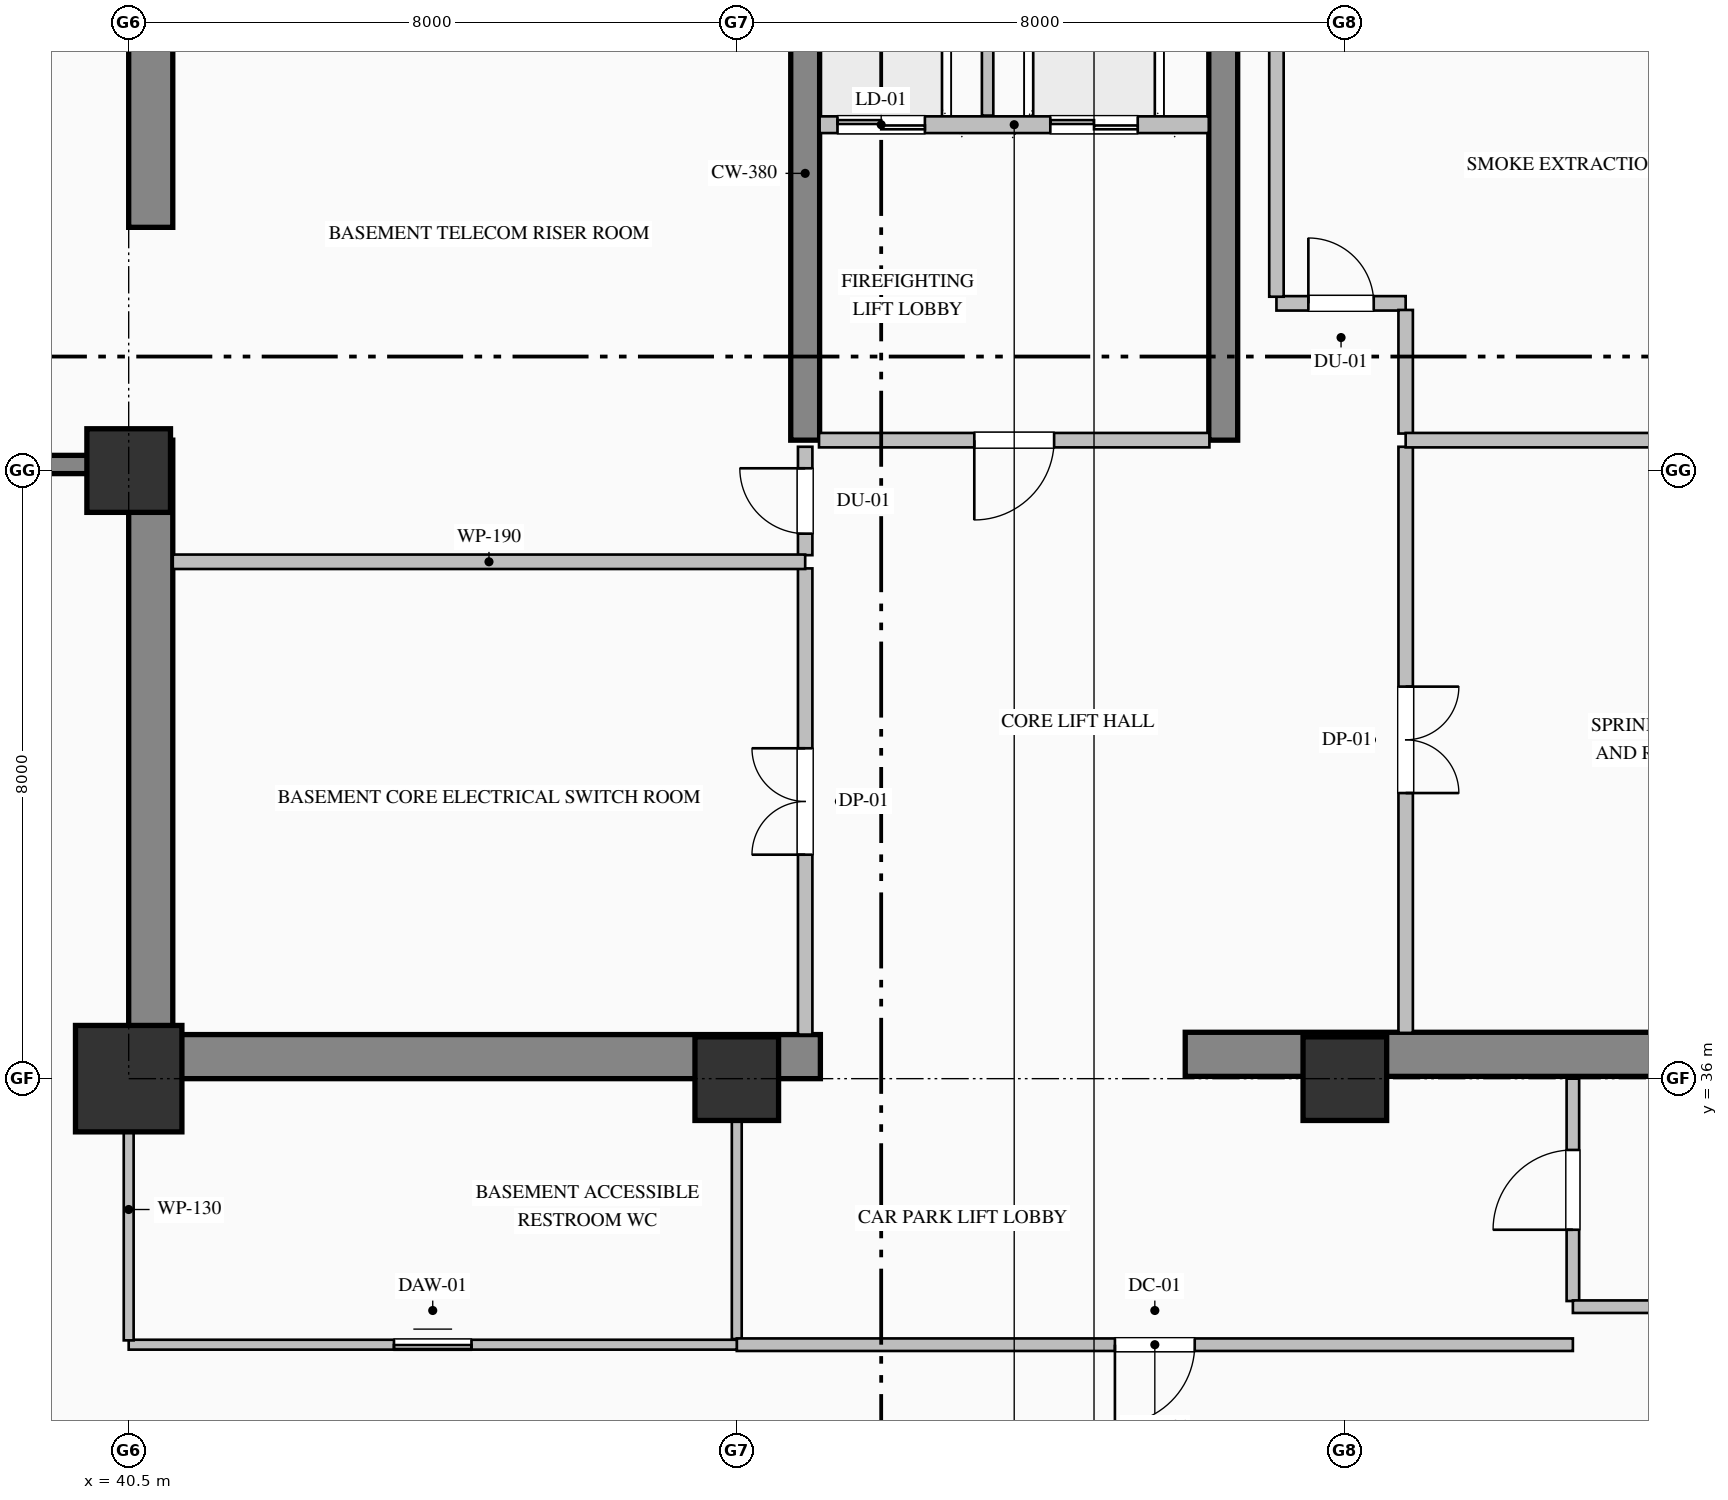
"""IFC4 building model, lengths in metres.
Left out: names, types, materials, properties, quantities, classifications, styles, units other than length and angle.
Written with IfcOpenShell. Run it as: python <this file> out.ifc"""

import sys

from ifc_helpers import new_model, si_unit, direction, frame, frame_2d, origin, origin_2d, place, context, subcontext, project, spatial, rectangle, hollow_rectangle, extrude, element, fill, save


model = new_model("IFC4")
c1 = context("Model", 3, precision=1e-05, world=origin(), true_north=direction((0.0, 1.0)))
c2 = subcontext(c1, "Body", "Model", "MODEL_VIEW")
j1 = project(units=[si_unit("LENGTHUNIT", "METRE"), si_unit("PLANEANGLEUNIT", "RADIAN")], contexts=[c1])
p1 = place(None, origin())
s1 = spatial("IfcSite", under=j1, at=p1, CompositionType="ELEMENT")
p2 = place(p1, origin())
s2 = spatial("IfcBuilding", under=s1, at=p2, CompositionType="ELEMENT")
p3 = place(p2, frame((0.0, 0.0, -4.6)))
s3 = spatial("IfcBuildingStorey", under=s2, at=p3, CompositionType="ELEMENT", Elevation=-4.6)
p4 = place(p3, frame((40.79, 36.58, 0.0), z_axis=(0.0, 0.0, 1.0), x_axis=(0.0, 1.0, 0.0)))
e1 = element("IfcWall", 1, at=p4, inside=s3, PredefinedType="SHEAR", context=c2, shape_type="SweptSolid", body=[
    extrude(rectangle(XDim=7.82, YDim=0.58, at=frame_2d((3.91, 0.0))), origin(), (0.0, 0.0, 1.0), 4.18),
])
p5 = place(p3, frame((40.79, 47.2, 0.0), z_axis=(0.0, 0.0, 1.0), x_axis=(0.0, 1.0, 0.0)))
e2 = element("IfcWall", 2, at=p5, inside=s3, PredefinedType="SHEAR", context=c2, shape_type="SweptSolid", body=[
    extrude(rectangle(XDim=4.22, YDim=0.58, at=frame_2d((2.11, 0.0))), origin(), (0.0, 0.0, 1.0), 4.18),
])
p6 = place(p3, frame((40.5, 36.29, 0.0), z_axis=(0.0, 0.0, 1.0), x_axis=(1.0, 0.0, 0.0)))
e3 = element("IfcWall", 3, at=p6, inside=s3, PredefinedType="SHEAR", context=c2, shape_type="SweptSolid", body=[
    extrude(rectangle(XDim=9.1, YDim=0.58, at=frame_2d((4.55, 0.0))), origin(), (0.0, 0.0, 1.0), 4.18),
])
p7 = place(p3, frame((54.4, 36.32, 0.0), z_axis=(0.0, 0.0, 1.0), x_axis=(1.0, 0.0, 0.0)))
e4 = element("IfcWall", 4, at=p7, inside=s3, PredefinedType="SHEAR", context=c2, shape_type="SweptSolid", body=[
    extrude(rectangle(XDim=9.6, YDim=0.58, at=frame_2d((4.8, 0.0))), origin(), (0.0, 0.0, 1.0), 4.6),
])
for number, where, z_axis, x_axis in (
    (5, (49.4, 44.4, 0.0), (0.0, 0.0, 1.0), (0.0, 1.0, 0.0)),
    (6, (54.9, 44.4, 0.0), (0.0, 0.0, 1.0), (0.0, 1.0, 0.0)),
):
    element("IfcWall", number, at=place(p3, frame(where, z_axis=z_axis, x_axis=x_axis)), inside=s3, PredefinedType="SHEAR", context=c2, shape_type="SweptSolid", body=[
        extrude(rectangle(XDim=7.02, YDim=0.38, at=frame_2d((3.51, 0.0))), origin(), (0.0, 0.0, 1.0), 4.18),
    ])
p8 = place(p3, frame((40.5, 36.0, 0.0), z_axis=(0.0, 0.0, 1.0), x_axis=(1.0, 0.0, 0.0)))
e7 = element("IfcColumn", 7, at=p8, inside=s3, PredefinedType="COLUMN", context=c2, shape_type="SweptSolid", body=[
    extrude(hollow_rectangle(XDim=1.4, YDim=1.4, WallThickness=0.05, at=origin_2d()), origin(), (0.0, 0.0, 1.0), 4.6),
])
for number, where, z_axis, x_axis in (
    (8, (40.5, 44.0, 0.0), (0.0, 0.0, 1.0), (1.0, 0.0, 0.0)),
    (9, (48.5, 36.0, 0.0), (0.0, 0.0, 1.0), (1.0, 0.0, 0.0)),
    (10, (56.5, 36.0, 0.0), (0.0, 0.0, 1.0), (1.0, 0.0, 0.0)),
):
    element("IfcColumn", number, at=place(p3, frame(where, z_axis=z_axis, x_axis=x_axis)), inside=s3, PredefinedType="COLUMN", context=c2, shape_type="SweptSolid", body=[
        extrude(rectangle(XDim=1.1, YDim=1.1, at=origin_2d()), origin(), (0.0, 0.0, 1.0), 4.6),
    ])
p9 = place(p3, frame((39.97, 44.08, 0.0), z_axis=(0.0, 0.0, 1.0), x_axis=(-1.0, 0.0, 0.0)))
e11 = element("IfcWall", 11, at=p9, inside=s3, PredefinedType="SOLIDWALL", context=c2, shape_type="SweptSolid", body=[
    extrude(rectangle(XDim=8.41, YDim=0.24, at=frame_2d((4.205, 0.0))), origin(), (0.0, 0.0, 1.0), 4.6),
])
p10 = place(p3, frame((54.71, 48.55, 0.0), z_axis=(0.0, 0.0, 1.0), x_axis=(-1.0, 0.0, 0.0)))
e12 = element("IfcWall", 12, at=p10, inside=s3, PredefinedType="PARTITIONING", context=c2, shape_type="SweptSolid", body=[
    extrude(rectangle(XDim=5.12, YDim=0.22, at=frame_2d((2.56, 0.0))), origin(), (0.0, 0.0, 1.0), 4.18),
])
p11 = place(p10, frame((3.735, 0.0, 0.0)))
e13 = element("IfcOpeningElement", 13, at=p11, cuts=e12, PredefinedType="OPENING", context=c2, shape_type="SweptSolid", body=[
    extrude(rectangle(XDim=1.15, YDim=2.2, at=frame_2d((0.575, 1.1))), frame((0.0, 0.12, 0.0), z_axis=(0.0, -1.0, 0.0), x_axis=(1.0, 0.0, 0.0)), (0.0, 0.0, 1.0), 0.24),
])
p12 = place(p10, frame((0.935, 0.0, 0.0)))
e14 = element("IfcOpeningElement", 14, at=p12, cuts=e12, PredefinedType="OPENING", context=c2, shape_type="SweptSolid", body=[
    extrude(rectangle(XDim=1.15, YDim=2.2, at=frame_2d((0.575, 1.1))), frame((0.0, 0.12, 0.0), z_axis=(0.0, -1.0, 0.0), x_axis=(1.0, 0.0, 0.0)), (0.0, 0.0, 1.0), 0.24),
])
p13 = place(p3, frame((51.8, 48.67, 0.0), z_axis=(0.0, 0.0, 1.0), x_axis=(0.0, 1.0, 0.0)))
e15 = element("IfcWall", 15, at=p13, inside=s3, PredefinedType="PARTITIONING", context=c2, shape_type="SweptSolid", body=[
    extrude(rectangle(XDim=2.75, YDim=0.15, at=frame_2d((1.375, 0.0))), origin(), (0.0, 0.0, 1.0), 4.18),
])
p14 = place(p3, frame((54.718, 44.4, 0.0), z_axis=(0.0, 0.0, 1.0), x_axis=(-1.0, 0.0, 0.0)))
e16 = element("IfcWall", 16, at=p14, inside=s3, PredefinedType="PARTITIONING", context=c2, shape_type="SweptSolid", body=[
    extrude(rectangle(XDim=5.136, YDim=0.19, at=frame_2d((2.568, 0.0))), origin(), (0.0, 0.0, 1.0), 4.18),
])
p15 = place(p14, frame((2.043, 0.0, 0.0)))
e17 = element("IfcOpeningElement", 17, at=p15, cuts=e16, PredefinedType="OPENING", context=c2, shape_type="SweptSolid", body=[
    extrude(rectangle(XDim=1.05, YDim=2.15, at=frame_2d((0.525, 1.075))), frame((0.0, 0.105, 0.0), z_axis=(0.0, -1.0, 0.0), x_axis=(1.0, 0.0, 0.0)), (0.0, 0.0, 1.0), 0.21),
])
p16 = place(p3, frame((49.4, 36.58, 0.0), z_axis=(0.0, 0.0, 1.0), x_axis=(0.0, 1.0, 0.0)))
e18 = element("IfcWall", 18, at=p16, inside=s3, PredefinedType="PARTITIONING", context=c2, shape_type="SweptSolid", body=[
    extrude(rectangle(XDim=6.133, YDim=0.19, at=frame_2d((3.066, 0.0))), origin(), (0.0, 0.0, 1.0), 3.272),
])
p17 = place(p16, frame((2.366, 0.0, 0.0)))
e19 = element("IfcOpeningElement", 19, at=p17, cuts=e18, PredefinedType="OPENING", context=c2, shape_type="SweptSolid", body=[
    extrude(rectangle(XDim=1.4, YDim=2.25, at=frame_2d((0.7, 1.125))), frame((0.0, 0.105, 0.0), z_axis=(0.0, -1.0, 0.0), x_axis=(1.0, 0.0, 0.0)), (0.0, 0.0, 1.0), 0.21),
])
p18 = place(p3, frame((49.4, 42.887, 0.0), z_axis=(0.0, 0.0, 1.0), x_axis=(0.0, 1.0, 0.0)))
e20 = element("IfcWall", 20, at=p18, inside=s3, PredefinedType="PARTITIONING", context=c2, shape_type="SweptSolid", body=[
    extrude(rectangle(XDim=1.426, YDim=0.19, at=frame_2d((0.713, 0.0))), origin(), (0.0, 0.0, 1.0), 3.272),
])
p19 = place(p18, frame((0.283, 0.0, 0.0)))
e21 = element("IfcOpeningElement", 21, at=p19, cuts=e20, PredefinedType="OPENING", context=c2, shape_type="SweptSolid", body=[
    extrude(rectangle(XDim=0.86, YDim=2.1, at=frame_2d((0.43, 1.05))), frame((0.0, 0.105, 0.0), z_axis=(0.0, -1.0, 0.0), x_axis=(1.0, 0.0, 0.0)), (0.0, 0.0, 1.0), 0.21),
])
p20 = place(p3, frame((57.3, 44.313, 0.0), z_axis=(0.0, 0.0, 1.0), x_axis=(0.0, -1.0, 0.0)))
e22 = element("IfcWall", 22, at=p20, inside=s3, PredefinedType="PARTITIONING", context=c2, shape_type="SweptSolid", body=[
    extrude(rectangle(XDim=7.711, YDim=0.19, at=frame_2d((3.855, 0.0))), origin(), (0.0, 0.0, 1.0), 4.18),
])
p21 = place(p20, frame((3.156, 0.0, 0.0)))
e23 = element("IfcOpeningElement", 23, at=p21, cuts=e22, PredefinedType="OPENING", context=c2, shape_type="SweptSolid", body=[
    extrude(rectangle(XDim=1.4, YDim=2.25, at=frame_2d((0.7, 1.125))), frame((0.0, 0.105, 0.0), z_axis=(0.0, -1.0, 0.0), x_axis=(1.0, 0.0, 0.0)), (0.0, 0.0, 1.0), 0.21),
])
p22 = place(p3, frame((55.6, 46.2, 0.0), z_axis=(0.0, 0.0, 1.0), x_axis=(1.0, 0.0, 0.0)))
e24 = element("IfcWall", 24, at=p22, inside=s3, PredefinedType="PARTITIONING", context=c2, shape_type="SweptSolid", body=[
    extrude(rectangle(XDim=1.7, YDim=0.19, at=frame_2d((0.85, 0.0))), origin(), (0.0, 0.0, 1.0), 4.18),
])
p23 = place(p22, frame((0.42, 0.0, 0.0)))
e25 = element("IfcOpeningElement", 25, at=p23, cuts=e24, PredefinedType="OPENING", context=c2, shape_type="SweptSolid", body=[
    extrude(rectangle(XDim=0.86, YDim=2.1, at=frame_2d((0.43, 1.05))), frame((0.0, 0.105, 0.0), z_axis=(0.0, -1.0, 0.0), x_axis=(1.0, 0.0, 0.0)), (0.0, 0.0, 1.0), 0.21),
])
p24 = place(p3, frame((57.3, 46.113, 0.0), z_axis=(0.0, 0.0, 1.0), x_axis=(0.0, -1.0, 0.0)))
e26 = element("IfcWall", 26, at=p24, inside=s3, PredefinedType="PARTITIONING", context=c2, shape_type="SweptSolid", body=[
    extrude(rectangle(XDim=1.626, YDim=0.19, at=frame_2d((0.813, 0.0))), origin(), (0.0, 0.0, 1.0), 4.18),
])
p25 = place(p3, frame((41.08, 42.8, 0.0), z_axis=(0.0, 0.0, 1.0), x_axis=(1.0, 0.0, 0.0)))
e27 = element("IfcWall", 27, at=p25, inside=s3, PredefinedType="PARTITIONING", context=c2, shape_type="SweptSolid", body=[
    extrude(rectangle(XDim=8.32, YDim=0.19, at=frame_2d((4.16, 0.0))), origin(), (0.0, 0.0, 1.0), 4.18),
])
p26 = place(p3, frame((57.3, 44.4, 0.0), z_axis=(0.0, 0.0, 1.0), x_axis=(1.0, 0.0, 0.0)))
e28 = element("IfcWall", 28, at=p26, inside=s3, PredefinedType="PARTITIONING", context=c2, shape_type="SweptSolid", body=[
    extrude(rectangle(XDim=6.12, YDim=0.19, at=frame_2d((3.06, 0.0))), origin(), (0.0, 0.0, 1.0), 4.18),
])
p27 = place(p3, frame((55.6, 46.287, 0.0), z_axis=(0.0, 0.0, 1.0), x_axis=(0.0, 1.0, 0.0)))
e29 = element("IfcWall", 29, at=p27, inside=s3, PredefinedType="PARTITIONING", context=c2, shape_type="SweptSolid", body=[
    extrude(rectangle(XDim=5.133, YDim=0.19, at=frame_2d((2.566, 0.0))), origin(), (0.0, 0.0, 1.0), 4.18),
])
p28 = place(p3, frame((59.5, 33.074, 0.0), z_axis=(0.0, 0.0, 1.0), x_axis=(0.0, 1.0, 0.0)))
e30 = element("IfcWall", 30, at=p28, inside=s3, PredefinedType="PARTITIONING", context=c2, shape_type="SweptSolid", body=[
    extrude(rectangle(XDim=2.926, YDim=0.165, at=frame_2d((1.463, 0.0))), origin(), (0.0, 0.0, 1.0), 4.18),
])
p29 = place(p28, frame((0.938, 0.0, 0.0)))
e31 = element("IfcOpeningElement", 31, at=p29, cuts=e30, PredefinedType="OPENING", context=c2, shape_type="SweptSolid", body=[
    extrude(rectangle(XDim=1.05, YDim=2.15, at=frame_2d((0.525, 1.075))), frame((0.0, 0.093, 0.0), z_axis=(0.0, -1.0, 0.0), x_axis=(1.0, 0.0, 0.0)), (0.0, 0.0, 1.0), 0.185),
])
p30 = place(p3, frame((66.8, 33.0, 0.0), z_axis=(0.0, 0.0, 1.0), x_axis=(-1.0, 0.0, 0.0)))
e32 = element("IfcWall", 32, at=p30, inside=s3, PredefinedType="PARTITIONING", context=c2, shape_type="SweptSolid", body=[
    extrude(rectangle(XDim=7.3, YDim=0.165, at=frame_2d((3.65, 0.0))), origin(), (0.0, 0.0, 1.0), 4.18),
])
p31 = place(p30, frame((3.125, 0.0, 0.0)))
e33 = element("IfcOpeningElement", 33, at=p31, cuts=e32, PredefinedType="OPENING", context=c2, shape_type="SweptSolid", body=[
    extrude(rectangle(XDim=1.05, YDim=2.15, at=frame_2d((0.525, 1.075))), frame((0.0, 0.093, 0.0), z_axis=(0.0, -1.0, 0.0), x_axis=(1.0, 0.0, 0.0)), (0.0, 0.0, 1.0), 0.185),
])
p32 = place(p3, frame((48.5, 32.574, 0.0), z_axis=(0.0, 0.0, 1.0), x_axis=(0.0, 1.0, 0.0)))
e34 = element("IfcWall", 34, at=p32, inside=s3, PredefinedType="PARTITIONING", context=c2, shape_type="SweptSolid", body=[
    extrude(rectangle(XDim=3.426, YDim=0.13, at=frame_2d((1.713, 0.0))), origin(), (0.0, 0.0, 1.0), 3.272),
])
p33 = place(p3, frame((59.5, 32.5, 0.0), z_axis=(0.0, 0.0, 1.0), x_axis=(-1.0, 0.0, 0.0)))
e35 = element("IfcWall", 35, at=p33, inside=s3, PredefinedType="PARTITIONING", context=c2, shape_type="SweptSolid", body=[
    extrude(rectangle(XDim=11.0, YDim=0.165, at=frame_2d((5.5, 0.0))), origin(), (0.0, 0.0, 1.0), 4.18),
])
p34 = place(p33, frame((4.975, 0.0, 0.0)))
e36 = element("IfcOpeningElement", 36, at=p34, cuts=e35, PredefinedType="OPENING", context=c2, shape_type="SweptSolid", body=[
    extrude(rectangle(XDim=1.05, YDim=2.15, at=frame_2d((0.525, 1.075))), frame((0.0, 0.093, 0.0), z_axis=(0.0, -1.0, 0.0), x_axis=(1.0, 0.0, 0.0)), (0.0, 0.0, 1.0), 0.185),
])
p35 = place(p3, frame((48.5, 32.5, 0.0), z_axis=(0.0, 0.0, 1.0), x_axis=(-1.0, 0.0, 0.0)))
e37 = element("IfcWall", 37, at=p35, inside=s3, PredefinedType="PARTITIONING", context=c2, shape_type="SweptSolid", body=[
    extrude(rectangle(XDim=8.0, YDim=0.13, at=frame_2d((4.0, 0.0))), origin(), (0.0, 0.0, 1.0), 4.18),
])
p36 = place(p35, frame((3.49, 0.0, 0.0)))
e38 = element("IfcOpeningElement", 38, at=p36, cuts=e37, PredefinedType="OPENING", context=c2, shape_type="SweptSolid", body=[
    extrude(rectangle(XDim=1.02, YDim=2.15, at=frame_2d((0.51, 1.075))), frame((0.0, 0.075, 0.0), z_axis=(0.0, -1.0, 0.0), x_axis=(1.0, 0.0, 0.0)), (0.0, 0.0, 1.0), 0.15),
])
p37 = place(p3, frame((40.5, 32.557, 0.0), z_axis=(0.0, 0.0, 1.0), x_axis=(0.0, 1.0, 0.0)))
e39 = element("IfcWall", 39, at=p37, inside=s3, PredefinedType="PARTITIONING", context=c2, shape_type="SweptSolid", body=[
    extrude(rectangle(XDim=3.443, YDim=0.13, at=frame_2d((1.722, 0.0))), origin(), (0.0, 0.0, 1.0), 3.272),
])
p38 = place(p11, origin())
e40 = element("IfcDoor", 40, at=p38, inside=s3, OperationType="DOUBLE_DOOR_SLIDING", PredefinedType="DOOR", context=c2, shape_type="SweptSolid", body=[
    extrude(rectangle(XDim=1.15, YDim=2.2, at=frame_2d((0.575, 1.1))), frame((0.0, 0.025, 0.0), z_axis=(0.0, -1.0, 0.0), x_axis=(1.0, 0.0, 0.0)), (0.0, 0.0, 1.0), 0.05),
])
fill(e13, e40)
p39 = place(p12, origin())
e41 = element("IfcDoor", 41, at=p39, inside=s3, OperationType="DOUBLE_DOOR_SLIDING", PredefinedType="DOOR", context=c2, shape_type="SweptSolid", body=[
    extrude(rectangle(XDim=1.15, YDim=2.2, at=frame_2d((0.575, 1.1))), frame((0.0, 0.025, 0.0), z_axis=(0.0, -1.0, 0.0), x_axis=(1.0, 0.0, 0.0)), (0.0, 0.0, 1.0), 0.05),
])
fill(e14, e41)
p40 = place(p34, origin())
e42 = element("IfcDoor", 42, at=p40, inside=s3, OperationType="SINGLE_SWING_RIGHT", PredefinedType="DOOR", context=c2, shape_type="SweptSolid", body=[
    extrude(rectangle(XDim=1.05, YDim=2.15, at=frame_2d((0.525, 1.075))), frame((0.0, 0.025, 0.0), z_axis=(0.0, -1.0, 0.0), x_axis=(1.0, 0.0, 0.0)), (0.0, 0.0, 1.0), 0.05),
])
fill(e36, e42)
p41 = place(p15, origin())
e43 = element("IfcDoor", 43, at=p41, inside=s3, OperationType="SINGLE_SWING_RIGHT", PredefinedType="DOOR", context=c2, shape_type="SweptSolid", body=[
    extrude(rectangle(XDim=1.05, YDim=2.15, at=frame_2d((0.525, 1.075))), frame((0.0, 0.025, 0.0), z_axis=(0.0, -1.0, 0.0), x_axis=(1.0, 0.0, 0.0)), (0.0, 0.0, 1.0), 0.05),
])
fill(e17, e43)
p42 = place(p29, origin())
e44 = element("IfcDoor", 44, at=p42, inside=s3, OperationType="SINGLE_SWING_LEFT", PredefinedType="DOOR", context=c2, shape_type="SweptSolid", body=[
    extrude(rectangle(XDim=1.05, YDim=2.15, at=frame_2d((0.525, 1.075))), frame((0.0, 0.025, 0.0), z_axis=(0.0, -1.0, 0.0), x_axis=(1.0, 0.0, 0.0)), (0.0, 0.0, 1.0), 0.05),
])
fill(e31, e44)
p43 = place(p17, origin())
e45 = element("IfcDoor", 45, at=p43, inside=s3, OperationType="DOUBLE_DOOR_SINGLE_SWING", PredefinedType="DOOR", context=c2, shape_type="SweptSolid", body=[
    extrude(rectangle(XDim=1.4, YDim=2.25, at=frame_2d((0.7, 1.125))), frame((0.0, 0.025, 0.0), z_axis=(0.0, -1.0, 0.0), x_axis=(1.0, 0.0, 0.0)), (0.0, 0.0, 1.0), 0.05),
])
fill(e19, e45)
p44 = place(p19, origin())
e46 = element("IfcDoor", 46, at=p44, inside=s3, OperationType="SINGLE_SWING_RIGHT", PredefinedType="DOOR", context=c2, shape_type="SweptSolid", body=[
    extrude(rectangle(XDim=0.86, YDim=2.1, at=frame_2d((0.43, 1.05))), frame((0.0, 0.025, 0.0), z_axis=(0.0, -1.0, 0.0), x_axis=(1.0, 0.0, 0.0)), (0.0, 0.0, 1.0), 0.05),
])
fill(e21, e46)
p45 = place(p21, origin())
e47 = element("IfcDoor", 47, at=p45, inside=s3, OperationType="DOUBLE_DOOR_SINGLE_SWING", PredefinedType="DOOR", context=c2, shape_type="SweptSolid", body=[
    extrude(rectangle(XDim=1.4, YDim=2.25, at=frame_2d((0.7, 1.125))), frame((0.0, 0.025, 0.0), z_axis=(0.0, -1.0, 0.0), x_axis=(1.0, 0.0, 0.0)), (0.0, 0.0, 1.0), 0.05),
])
fill(e23, e47)
p46 = place(p23, origin())
e48 = element("IfcDoor", 48, at=p46, inside=s3, OperationType="SINGLE_SWING_LEFT", PredefinedType="DOOR", context=c2, shape_type="SweptSolid", body=[
    extrude(rectangle(XDim=0.86, YDim=2.1, at=frame_2d((0.43, 1.05))), frame((0.0, 0.025, 0.0), z_axis=(0.0, -1.0, 0.0), x_axis=(1.0, 0.0, 0.0)), (0.0, 0.0, 1.0), 0.05),
])
fill(e25, e48)
p47 = place(p36, origin())
e49 = element("IfcDoor", 49, at=p47, inside=s3, OperationType="SLIDING_TO_LEFT", PredefinedType="DOOR", context=c2, shape_type="SweptSolid", body=[
    extrude(rectangle(XDim=1.02, YDim=2.15, at=frame_2d((0.51, 1.075))), frame((0.0, 0.025, 0.0), z_axis=(0.0, -1.0, 0.0), x_axis=(1.0, 0.0, 0.0)), (0.0, 0.0, 1.0), 0.05),
])
fill(e38, e49)
save(model, sys.argv[1])
